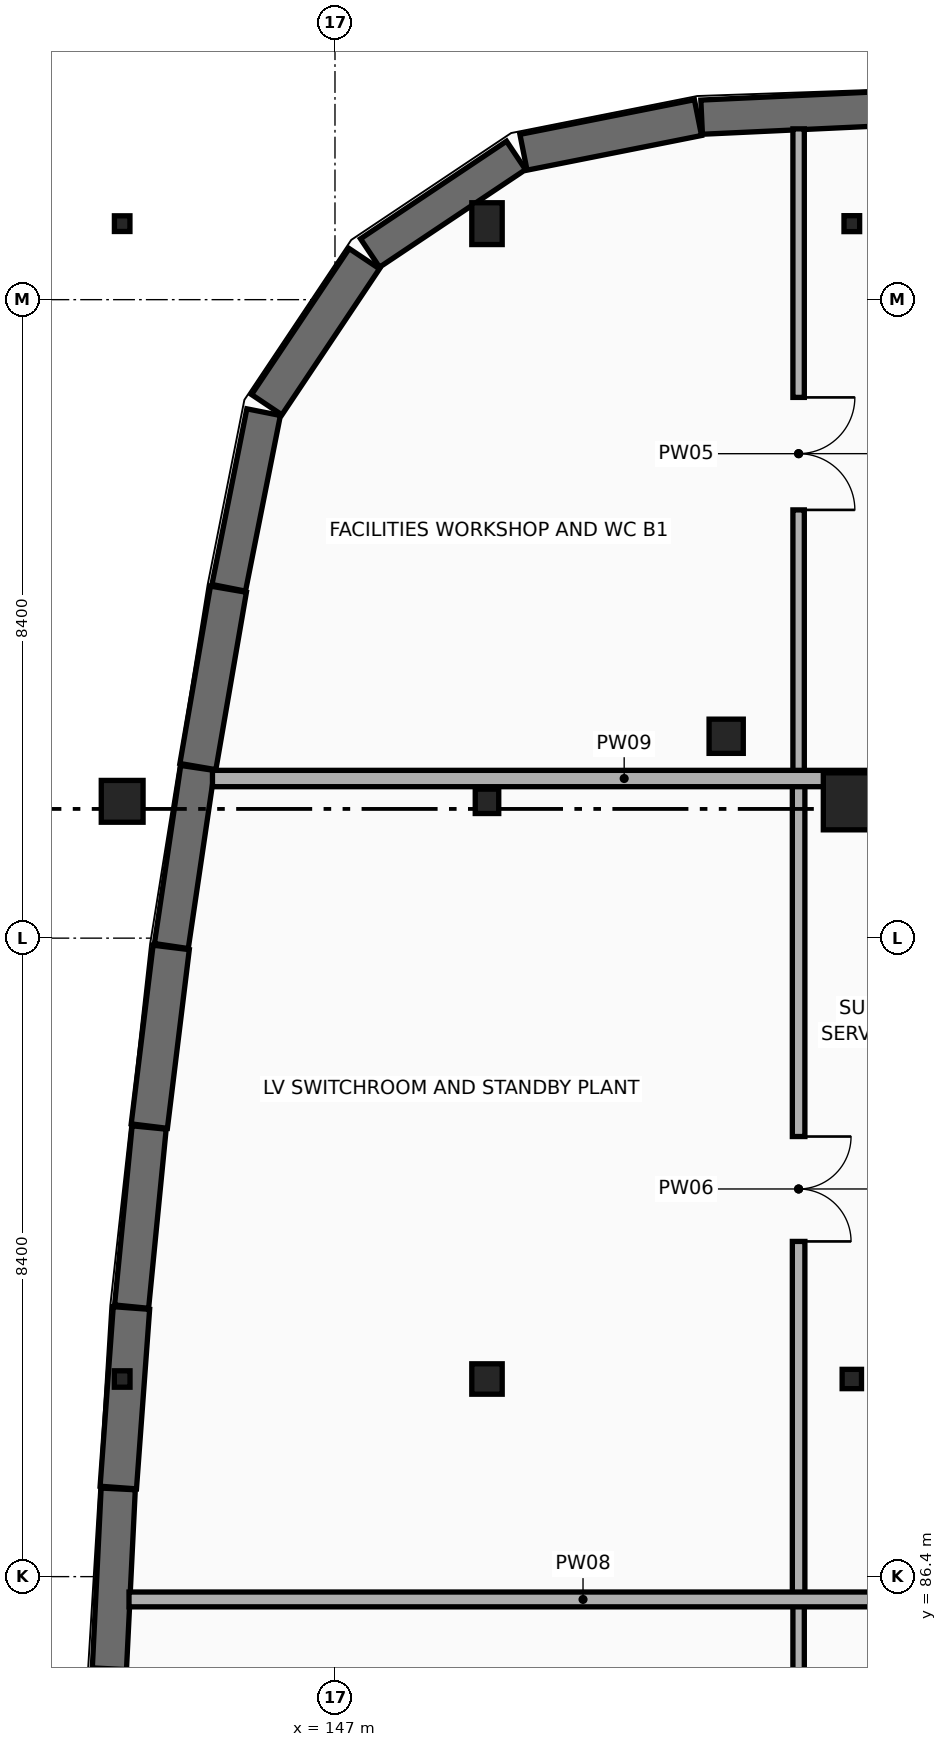
"""IFC4 building model, lengths in metres.
Left out: names, types, materials, properties, quantities, classifications, styles, units other than length and angle.
Written with IfcOpenShell. Run it as: python <this file> out.ifc"""

import sys

from ifc_helpers import new_model, si_unit, direction, frame, frame_2d, origin, origin_2d, place, context, subcontext, project, spatial, rectangle, i_section, extrude, element, fill, save


model = new_model("IFC4")
c1 = context("Model", 3, precision=1e-05, world=origin(), true_north=direction((0.0, 1.0)))
c2 = subcontext(c1, "Body", "Model", "MODEL_VIEW")
j1 = project(units=[si_unit("LENGTHUNIT", "METRE"), si_unit("PLANEANGLEUNIT", "RADIAN")], contexts=[c1])
p1 = place(None, origin())
s1 = spatial("IfcSite", under=j1, at=p1, CompositionType="ELEMENT")
p2 = place(p1, origin())
s2 = spatial("IfcBuilding", under=s1, at=p2, CompositionType="ELEMENT")
p3 = place(p2, frame((0.0, 0.0, -4.2)))
s3 = spatial("IfcBuildingStorey", under=s2, at=p3, CompositionType="ELEMENT", Elevation=-4.2)
p4 = place(p3, frame((144.2, 89.0, -0.415), z_axis=(0.0, 0.0, 1.0), x_axis=(1.0, 0.0, 0.0)))
e1 = element("IfcColumn", 1, at=p4, inside=s3, PredefinedType="COLUMN", context=c2, shape_type="SweptSolid", body=[
    extrude(i_section(OverallWidth=0.206, OverallDepth=0.216, WebThickness=0.01, FlangeThickness=0.017, at=origin_2d()), origin(), (0.0, 0.0, 1.0), 4.615),
])
p5 = place(p3, frame((144.2, 96.6, -0.415), z_axis=(0.0, 0.0, 1.0), x_axis=(1.0, 0.0, 0.0)))
e2 = element("IfcColumn", 2, at=p5, inside=s3, PredefinedType="COLUMN", context=c2, shape_type="SweptSolid", body=[
    extrude(rectangle(XDim=0.55, YDim=0.55, at=origin_2d()), origin(), (0.0, 0.0, 1.0), 4.615),
])
p6 = place(p3, frame((144.2, 104.2, -0.415), z_axis=(0.0, 0.0, 1.0), x_axis=(1.0, 0.0, 0.0)))
e3 = element("IfcColumn", 3, at=p6, inside=s3, PredefinedType="COLUMN", context=c2, shape_type="SweptSolid", body=[
    extrude(i_section(OverallWidth=0.204, OverallDepth=0.206, WebThickness=0.008, FlangeThickness=0.012, at=origin_2d()), origin(), (0.0, 0.0, 1.0), 4.615),
])
p7 = place(p3, frame((149.0, 89.0, -0.415), z_axis=(0.0, 0.0, 1.0), x_axis=(1.0, 0.0, 0.0)))
e4 = element("IfcColumn", 4, at=p7, inside=s3, PredefinedType="COLUMN", context=c2, shape_type="SweptSolid", body=[
    extrude(rectangle(XDim=0.4, YDim=0.4, at=origin_2d()), origin(), (0.0, 0.0, 1.0), 4.615),
])
p8 = place(p3, frame((149.0, 96.6, -0.415), z_axis=(0.0, 0.0, 1.0), x_axis=(1.0, 0.0, 0.0)))
e5 = element("IfcColumn", 5, at=p8, inside=s3, PredefinedType="COLUMN", context=c2, shape_type="SweptSolid", body=[
    extrude(i_section(OverallWidth=0.309, OverallDepth=0.321, WebThickness=0.014, FlangeThickness=0.022, at=origin_2d()), origin(), (0.0, 0.0, 1.0), 4.615),
])
p9 = place(p3, frame((149.0, 104.2, -0.415), z_axis=(0.0, 0.0, 1.0), x_axis=(1.0, 0.0, 0.0)))
e6 = element("IfcColumn", 6, at=p9, inside=s3, PredefinedType="COLUMN", context=c2, shape_type="SweptSolid", body=[
    extrude(rectangle(XDim=0.4, YDim=0.55, at=origin_2d()), origin(), (0.0, 0.0, 1.0), 4.615),
])
p10 = place(p3, frame((153.8, 89.0, -0.415), z_axis=(0.0, 0.0, 1.0), x_axis=(1.0, 0.0, 0.0)))
e7 = element("IfcColumn", 7, at=p10, inside=s3, PredefinedType="COLUMN", context=c2, shape_type="SweptSolid", body=[
    extrude(i_section(OverallWidth=0.255, OverallDepth=0.254, WebThickness=0.009, FlangeThickness=0.014, at=origin_2d()), origin(), (0.0, 0.0, 1.0), 4.615),
])
p11 = place(p3, frame((153.8, 96.6, -0.415), z_axis=(0.0, 0.0, 1.0), x_axis=(1.0, 0.0, 0.0)))
e8 = element("IfcColumn", 8, at=p11, inside=s3, PredefinedType="COLUMN", context=c2, shape_type="SweptSolid", body=[
    extrude(rectangle(XDim=0.75, YDim=0.75, at=origin_2d()), origin(), (0.0, 0.0, 1.0), 4.615),
])
p12 = place(p3, frame((153.8, 104.2, -0.415), z_axis=(0.0, 0.0, 1.0), x_axis=(1.0, 0.0, 0.0)))
e9 = element("IfcColumn", 9, at=p12, inside=s3, PredefinedType="COLUMN", context=c2, shape_type="SweptSolid", body=[
    extrude(i_section(OverallWidth=0.206, OverallDepth=0.21, WebThickness=0.01, FlangeThickness=0.014, at=origin_2d()), origin(), (0.0, 0.0, 1.0), 4.615),
])
p13 = place(p3, frame((152.147, 97.456, -0.415), z_axis=(0.0, 0.0, 1.0), x_axis=(1.0, 0.0, 0.0)))
e10 = element("IfcColumn", 10, at=p13, inside=s3, PredefinedType="COLUMN", context=c2, shape_type="SweptSolid", body=[
    extrude(rectangle(XDim=0.45, YDim=0.45, at=origin_2d()), origin(), (0.0, 0.0, 1.0), 4.615),
])
p14 = place(p3, frame((151.824, 105.601, 0.0), z_axis=(0.0, 0.0, 1.0), x_axis=(0.998907846989, 0.0467237972, 0.0)))
e11 = element("IfcWall", 11, at=p14, inside=s3, PredefinedType="STANDARD", context=c2, shape_type="SweptSolid", body=[
    extrude(rectangle(XDim=2.289, YDim=0.45, at=frame_2d((1.144, 0.0))), origin(), (0.0, 0.0, 1.0), 3.882),
])
p15 = place(p3, frame((149.48, 105.139, 0.0), z_axis=(0.0, 0.0, 1.0), x_axis=(0.980836573739, 0.1948322756, 0.0)))
e12 = element("IfcWall", 12, at=p15, inside=s3, PredefinedType="STANDARD", context=c2, shape_type="SweptSolid", body=[
    extrude(rectangle(XDim=2.341, YDim=0.48, at=frame_2d((1.17, 0.0))), origin(), (0.0, 0.0, 1.0), 3.882),
])
p16 = place(p3, frame((147.461, 103.814, 0.0), z_axis=(0.0, 0.0, 1.0), x_axis=(0.831415808291, 0.555650747973, 0.0)))
e13 = element("IfcWall", 13, at=p16, inside=s3, PredefinedType="STANDARD", context=c2, shape_type="SweptSolid", body=[
    extrude(rectangle(XDim=2.311, YDim=0.45, at=frame_2d((1.155, 0.0))), origin(), (0.0, 0.0, 1.0), 3.882),
])
p17 = place(p3, frame((146.102, 101.818, 0.0), z_axis=(0.0, 0.0, 1.0), x_axis=(0.55569956244, 0.831383182597, 0.0)))
e14 = element("IfcWall", 14, at=p17, inside=s3, PredefinedType="STANDARD", context=c2, shape_type="SweptSolid", body=[
    extrude(rectangle(XDim=2.311, YDim=0.48, at=frame_2d((1.155, 0.0))), origin(), (0.0, 0.0, 1.0), 3.882),
])
p18 = place(p3, frame((145.602, 99.409, 0.0), z_axis=(0.0, 0.0, 1.0), x_axis=(0.19480081414, 0.980842822684, 0.0)))
e15 = element("IfcWall", 15, at=p18, inside=s3, PredefinedType="STANDARD", context=c2, shape_type="SweptSolid", body=[
    extrude(rectangle(XDim=2.356, YDim=0.45, at=frame_2d((1.178, 0.0))), origin(), (0.0, 0.0, 1.0), 3.882),
])
p19 = place(p3, frame((145.196, 97.057, 0.0), z_axis=(0.0, 0.0, 1.0), x_axis=(0.169661839761, 0.985502338977, 0.0)))
e16 = element("IfcWall", 16, at=p19, inside=s3, PredefinedType="STANDARD", context=c2, shape_type="SweptSolid", body=[
    extrude(rectangle(XDim=2.369, YDim=0.48, at=frame_2d((1.184, 0.0))), origin(), (0.0, 0.0, 1.0), 3.882),
])
p20 = place(p3, frame((144.847, 94.696, 0.0), z_axis=(0.0, 0.0, 1.0), x_axis=(0.146167599706, 0.989259840889, 0.0)))
e17 = element("IfcWall", 17, at=p20, inside=s3, PredefinedType="STANDARD", context=c2, shape_type="SweptSolid", body=[
    extrude(rectangle(XDim=2.368, YDim=0.45, at=frame_2d((1.184, 0.0))), origin(), (0.0, 0.0, 1.0), 3.882),
])
p21 = place(p3, frame((144.557, 92.327, 0.0), z_axis=(0.0, 0.0, 1.0), x_axis=(0.121624086898, 0.992576234597, 0.0)))
e18 = element("IfcWall", 18, at=p21, inside=s3, PredefinedType="STANDARD", context=c2, shape_type="SweptSolid", body=[
    extrude(rectangle(XDim=2.369, YDim=0.48, at=frame_2d((1.184, 0.0))), origin(), (0.0, 0.0, 1.0), 3.882),
])
p22 = place(p3, frame((144.324, 89.952, 0.0), z_axis=(0.0, 0.0, 1.0), x_axis=(0.097513367951, 0.995234215183, 0.0)))
e19 = element("IfcWall", 19, at=p22, inside=s3, PredefinedType="STANDARD", context=c2, shape_type="SweptSolid", body=[
    extrude(rectangle(XDim=2.368, YDim=0.45, at=frame_2d((1.184, 0.0))), origin(), (0.0, 0.0, 1.0), 3.882),
])
p23 = place(p3, frame((144.149, 87.572, 0.0), z_axis=(0.0, 0.0, 1.0), x_axis=(0.073085674135, 0.997325666087, 0.0)))
e20 = element("IfcWall", 20, at=p23, inside=s3, PredefinedType="STANDARD", context=c2, shape_type="SweptSolid", body=[
    extrude(rectangle(XDim=2.368, YDim=0.48, at=frame_2d((1.184, 0.0))), origin(), (0.0, 0.0, 1.0), 3.882),
])
p24 = place(p3, frame((144.032, 85.188, 0.0), z_axis=(0.0, 0.0, 1.0), x_axis=(0.04895577854, 0.99880094701, 0.0)))
e21 = element("IfcWall", 21, at=p24, inside=s3, PredefinedType="STANDARD", context=c2, shape_type="SweptSolid", body=[
    extrude(rectangle(XDim=2.369, YDim=0.45, at=frame_2d((1.185, 0.0))), origin(), (0.0, 0.0, 1.0), 3.882),
])
p25 = place(p3, frame((153.1, 86.1, 0.0), z_axis=(0.0, 0.0, 1.0), x_axis=(0.0, -1.0, 0.0)))
e22 = element("IfcWall", 22, at=p25, inside=s3, PredefinedType="PARTITIONING", context=c2, shape_type="SweptSolid", body=[
    extrude(rectangle(XDim=13.0, YDim=0.15, at=frame_2d((6.5, 0.0))), origin(), (0.0, 0.0, 1.0), 3.22),
])
p26 = place(p25, frame((6.03, 0.0, 0.0)))
e23 = element("IfcOpeningElement", 23, at=p26, cuts=e22, PredefinedType="OPENING", context=c2, shape_type="SweptSolid", body=[
    extrude(rectangle(XDim=0.94, YDim=2.1, at=frame_2d((0.47, 1.05))), frame((0.0, 0.085, 0.0), z_axis=(0.0, -1.0, 0.0), x_axis=(1.0, 0.0, 0.0)), (0.0, 0.0, 1.0), 0.17),
])
p27 = place(p3, frame((153.1, 96.9, 0.0), z_axis=(0.0, 0.0, 1.0), x_axis=(0.0, -1.0, 0.0)))
e24 = element("IfcWall", 24, at=p27, inside=s3, PredefinedType="PARTITIONING", context=c2, shape_type="SweptSolid", body=[
    extrude(rectangle(XDim=10.8, YDim=0.165, at=frame_2d((5.4, 0.0))), origin(), (0.0, 0.0, 1.0), 3.195),
])
p28 = place(p27, frame((4.71, 0.0, 0.0)))
e25 = element("IfcOpeningElement", 25, at=p28, cuts=e24, PredefinedType="OPENING", context=c2, shape_type="SweptSolid", body=[
    extrude(rectangle(XDim=1.38, YDim=2.2, at=frame_2d((0.69, 1.1))), frame((0.0, 0.093, 0.0), z_axis=(0.0, -1.0, 0.0), x_axis=(1.0, 0.0, 0.0)), (0.0, 0.0, 1.0), 0.185),
])
p29 = place(p3, frame((153.1, 105.447, 0.0), z_axis=(0.0, 0.0, 1.0), x_axis=(0.0, -1.0, 0.0)))
e26 = element("IfcWall", 26, at=p29, inside=s3, PredefinedType="PARTITIONING", context=c2, shape_type="SweptSolid", body=[
    extrude(rectangle(XDim=8.547, YDim=0.15, at=frame_2d((4.273, 0.0))), origin(), (0.0, 0.0, 1.0), 3.17),
])
p30 = place(p29, frame((3.533, 0.0, 0.0)))
e27 = element("IfcOpeningElement", 27, at=p30, cuts=e26, PredefinedType="OPENING", context=c2, shape_type="SweptSolid", body=[
    extrude(rectangle(XDim=1.48, YDim=2.22, at=frame_2d((0.74, 1.11))), frame((0.0, 0.085, 0.0), z_axis=(0.0, -1.0, 0.0), x_axis=(1.0, 0.0, 0.0)), (0.0, 0.0, 1.0), 0.17),
])
p31 = place(p3, frame((144.29, 86.1, 0.0), z_axis=(0.0, 0.0, 1.0), x_axis=(1.0, 0.0, 0.0)))
e28 = element("IfcWall", 28, at=p31, inside=s3, PredefinedType="PARTITIONING", context=c2, shape_type="SweptSolid", body=[
    extrude(rectangle(XDim=11.947, YDim=0.195, at=frame_2d((5.974, 0.0))), origin(), (0.0, 0.0, 1.0), 3.186),
])
p32 = place(p3, frame((145.388, 96.9, 0.0), z_axis=(0.0, 0.0, 1.0), x_axis=(1.0, 0.0, 0.0)))
e29 = element("IfcWall", 29, at=p32, inside=s3, PredefinedType="PARTITIONING", context=c2, shape_type="SweptSolid", body=[
    extrude(rectangle(XDim=10.834, YDim=0.215, at=frame_2d((5.417, 0.0))), origin(), (0.0, 0.0, 1.0), 3.108),
])
p33 = place(p28, origin())
e30 = element("IfcDoor", 30, at=p33, inside=s3, OperationType="DOUBLE_DOOR_SINGLE_SWING", PredefinedType="DOOR", context=c2, shape_type="SweptSolid", body=[
    extrude(rectangle(XDim=1.38, YDim=2.2, at=frame_2d((0.69, 1.1))), frame((0.0, 0.025, 0.0), z_axis=(0.0, -1.0, 0.0), x_axis=(1.0, 0.0, 0.0)), (0.0, 0.0, 1.0), 0.05),
])
fill(e25, e30)
p34 = place(p30, origin())
e31 = element("IfcDoor", 31, at=p34, inside=s3, OperationType="DOUBLE_DOOR_SINGLE_SWING", PredefinedType="DOOR", context=c2, shape_type="SweptSolid", body=[
    extrude(rectangle(XDim=1.48, YDim=2.22, at=frame_2d((0.74, 1.11))), frame((0.0, 0.025, 0.0), z_axis=(0.0, -1.0, 0.0), x_axis=(1.0, 0.0, 0.0)), (0.0, 0.0, 1.0), 0.05),
])
fill(e27, e31)
save(model, sys.argv[1])
